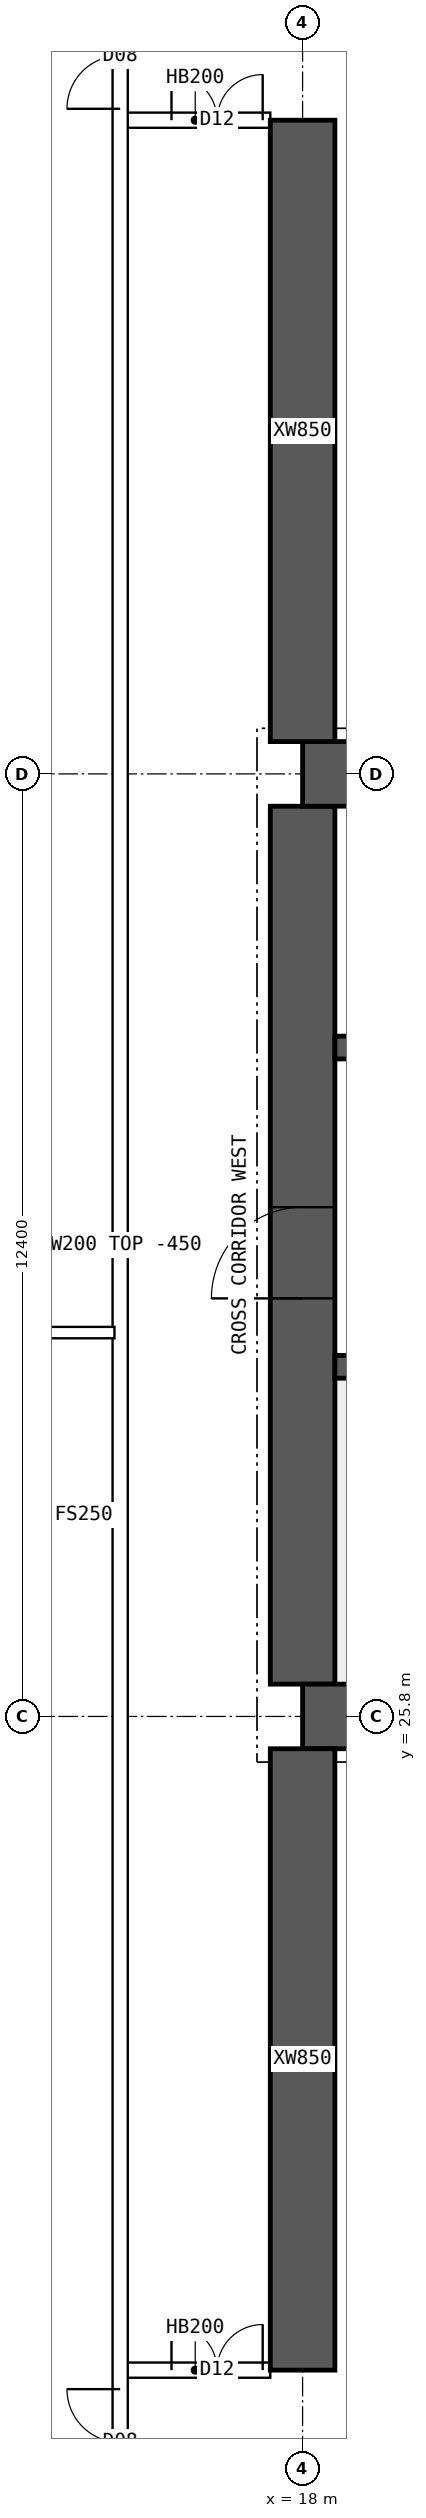
"""IFC4 building model, lengths in metres.
Left out: names, types, materials, properties, quantities, classifications, styles, units other than length and angle.
Written with IfcOpenShell. Run it as: python <this file> out.ifc"""

import sys

from ifc_helpers import new_model, si_unit, direction, frame, frame_2d, origin, place, context, subcontext, project, spatial, polyline, rectangle, outline, extrude, element, fill, save


model = new_model("IFC4")
c1 = context("Model", 3, precision=1e-05, world=origin(), true_north=direction((0.0, 1.0)))
c2 = subcontext(c1, "Body", "Model", "MODEL_VIEW")
j1 = project(units=[si_unit("LENGTHUNIT", "METRE"), si_unit("PLANEANGLEUNIT", "RADIAN")], contexts=[c1])
p1 = place(None, origin())
s1 = spatial("IfcSite", under=j1, at=p1, CompositionType="ELEMENT")
p2 = place(p1, origin())
s2 = spatial("IfcBuilding", under=s1, at=p2, CompositionType="ELEMENT")
p3 = place(p2, frame((0.0, 0.0, 144.85)))
s3 = spatial("IfcBuildingStorey", under=s2, at=p3, CompositionType="ELEMENT", Elevation=144.85)
for number, where, z_axis, x_axis in (
    (1, (18.0, 25.8, 0.0), (0.0, 0.0, 1.0), (1.0, 0.0, 0.0)),
    (2, (18.0, 38.2, 0.0), (0.0, 0.0, 1.0), (1.0, 0.0, 0.0)),
):
    element("IfcWall", number, at=place(p3, frame(where, z_axis=z_axis, x_axis=x_axis)), inside=s3, PredefinedType="SHEAR", context=c2, shape_type="SweptSolid", body=[
        extrude(rectangle(XDim=48.0, YDim=0.85, at=frame_2d((24.0, 0.0))), origin(), (0.0, 0.0, 1.0), 3.75),
    ])
p4 = place(p3, frame((18.0, 26.225, 0.0), z_axis=(0.0, 0.0, 1.0), x_axis=(0.0, 1.0, 0.0)))
e3 = element("IfcWall", 3, at=p4, inside=s3, PredefinedType="SHEAR", context=c2, shape_type="SweptSolid", body=[
    extrude(rectangle(XDim=11.55, YDim=0.85, at=frame_2d((5.775, 0.0))), origin(), (0.0, 0.0, 1.0), 3.75),
])
p5 = place(p4, frame((5.075, 0.0, 0.0)))
e4 = element("IfcOpeningElement", 4, at=p5, cuts=e3, PredefinedType="OPENING", context=c2, shape_type="SweptSolid", body=[
    extrude(rectangle(XDim=1.2, YDim=2.1, at=frame_2d((0.6, 1.05))), frame((0.0, 0.435, 0.0), z_axis=(0.0, -1.0, 0.0), x_axis=(1.0, 0.0, 0.0)), (0.0, 0.0, 1.0), 0.87),
])
p6 = place(p3, frame((18.425, 30.4, 0.0), z_axis=(0.0, 0.0, 1.0), x_axis=(1.0, 0.0, 0.0)))
e5 = element("IfcWall", 5, at=p6, inside=s3, PredefinedType="SHEAR", context=c2, shape_type="SweptSolid", body=[
    extrude(rectangle(XDim=47.15, YDim=0.3, at=frame_2d((23.575, 0.0))), origin(), (0.0, 0.0, 1.0), 3.75),
])
p7 = place(p6, frame((0.4, 0.0, 0.0)))
e6 = element("IfcOpeningElement", 6, at=p7, cuts=e5, PredefinedType="OPENING", context=c2, shape_type="SweptSolid", body=[
    extrude(rectangle(XDim=1.0, YDim=2.1, at=frame_2d((0.5, 1.05))), frame((0.0, 0.16, 0.0), z_axis=(0.0, -1.0, 0.0), x_axis=(1.0, 0.0, 0.0)), (0.0, 0.0, 1.0), 0.32),
])
p8 = place(p6, frame((45.75, 0.0, 0.0)))
e7 = element("IfcOpeningElement", 7, at=p8, cuts=e5, PredefinedType="OPENING", context=c2, shape_type="SweptSolid", body=[
    extrude(rectangle(XDim=1.0, YDim=2.1, at=frame_2d((0.5, 1.05))), frame((0.0, 0.16, 0.0), z_axis=(0.0, -1.0, 0.0), x_axis=(1.0, 0.0, 0.0)), (0.0, 0.0, 1.0), 0.32),
])
p9 = place(p6, frame((8.325, 0.0, 0.0)))
e8 = element("IfcOpeningElement", 8, at=p9, cuts=e5, PredefinedType="OPENING", context=c2, shape_type="SweptSolid", body=[
    extrude(rectangle(XDim=1.1, YDim=2.1, at=frame_2d((0.55, 1.05))), frame((0.0, 0.16, 0.0), z_axis=(0.0, -1.0, 0.0), x_axis=(1.0, 0.0, 0.0)), (0.0, 0.0, 1.0), 0.32),
])
p10 = place(p6, frame((10.925, 0.0, 0.0)))
e9 = element("IfcOpeningElement", 9, at=p10, cuts=e5, PredefinedType="OPENING", context=c2, shape_type="SweptSolid", body=[
    extrude(rectangle(XDim=1.1, YDim=2.1, at=frame_2d((0.55, 1.05))), frame((0.0, 0.16, 0.0), z_axis=(0.0, -1.0, 0.0), x_axis=(1.0, 0.0, 0.0)), (0.0, 0.0, 1.0), 0.32),
])
p11 = place(p6, frame((13.525, 0.0, 0.0)))
e10 = element("IfcOpeningElement", 10, at=p11, cuts=e5, PredefinedType="OPENING", context=c2, shape_type="SweptSolid", body=[
    extrude(rectangle(XDim=1.1, YDim=2.1, at=frame_2d((0.55, 1.05))), frame((0.0, 0.16, 0.0), z_axis=(0.0, -1.0, 0.0), x_axis=(1.0, 0.0, 0.0)), (0.0, 0.0, 1.0), 0.32),
])
p12 = place(p6, frame((16.125, 0.0, 0.0)))
e11 = element("IfcOpeningElement", 11, at=p12, cuts=e5, PredefinedType="OPENING", context=c2, shape_type="SweptSolid", body=[
    extrude(rectangle(XDim=1.1, YDim=2.1, at=frame_2d((0.55, 1.05))), frame((0.0, 0.16, 0.0), z_axis=(0.0, -1.0, 0.0), x_axis=(1.0, 0.0, 0.0)), (0.0, 0.0, 1.0), 0.32),
])
p13 = place(p6, frame((18.9, 0.0, 0.0)))
e12 = element("IfcOpeningElement", 12, at=p13, cuts=e5, PredefinedType="OPENING", context=c2, shape_type="SweptSolid", body=[
    extrude(rectangle(XDim=0.9, YDim=2.1, at=frame_2d((0.45, 1.05))), frame((0.0, 0.16, 0.0), z_axis=(0.0, -1.0, 0.0), x_axis=(1.0, 0.0, 0.0)), (0.0, 0.0, 1.0), 0.32),
])
p14 = place(p6, frame((30.192, 0.0, 0.0)))
e13 = element("IfcOpeningElement", 13, at=p14, cuts=e5, PredefinedType="OPENING", context=c2, shape_type="SweptSolid", body=[
    extrude(rectangle(XDim=1.1, YDim=2.1, at=frame_2d((0.55, 1.05))), frame((0.0, 0.16, 0.0), z_axis=(0.0, -1.0, 0.0), x_axis=(1.0, 0.0, 0.0)), (0.0, 0.0, 1.0), 0.32),
])
p15 = place(p6, frame((33.725, 0.0, 0.0)))
e14 = element("IfcOpeningElement", 14, at=p15, cuts=e5, PredefinedType="OPENING", context=c2, shape_type="SweptSolid", body=[
    extrude(rectangle(XDim=1.1, YDim=2.1, at=frame_2d((0.55, 1.05))), frame((0.0, 0.16, 0.0), z_axis=(0.0, -1.0, 0.0), x_axis=(1.0, 0.0, 0.0)), (0.0, 0.0, 1.0), 0.32),
])
p16 = place(p6, frame((37.258, 0.0, 0.0)))
e15 = element("IfcOpeningElement", 15, at=p16, cuts=e5, PredefinedType="OPENING", context=c2, shape_type="SweptSolid", body=[
    extrude(rectangle(XDim=1.1, YDim=2.1, at=frame_2d((0.55, 1.05))), frame((0.0, 0.16, 0.0), z_axis=(0.0, -1.0, 0.0), x_axis=(1.0, 0.0, 0.0)), (0.0, 0.0, 1.0), 0.32),
])
p17 = place(p3, frame((18.425, 34.6, 0.0), z_axis=(0.0, 0.0, 1.0), x_axis=(1.0, 0.0, 0.0)))
e16 = element("IfcWall", 16, at=p17, inside=s3, PredefinedType="SHEAR", context=c2, shape_type="SweptSolid", body=[
    extrude(rectangle(XDim=47.15, YDim=0.3, at=frame_2d((23.575, 0.0))), origin(), (0.0, 0.0, 1.0), 3.75),
])
p18 = place(p17, frame((0.9, 0.0, 0.0)))
e17 = element("IfcOpeningElement", 17, at=p18, cuts=e16, PredefinedType="OPENING", context=c2, shape_type="SweptSolid", body=[
    extrude(rectangle(XDim=1.1, YDim=2.1, at=frame_2d((0.55, 1.05))), frame((0.0, 0.16, 0.0), z_axis=(0.0, -1.0, 0.0), x_axis=(1.0, 0.0, 0.0)), (0.0, 0.0, 1.0), 0.32),
])
p19 = place(p17, frame((45.15, 0.0, 0.0)))
e18 = element("IfcOpeningElement", 18, at=p19, cuts=e16, PredefinedType="OPENING", context=c2, shape_type="SweptSolid", body=[
    extrude(rectangle(XDim=1.1, YDim=2.1, at=frame_2d((0.55, 1.05))), frame((0.0, 0.16, 0.0), z_axis=(0.0, -1.0, 0.0), x_axis=(1.0, 0.0, 0.0)), (0.0, 0.0, 1.0), 0.32),
])
p20 = place(p17, frame((4.175, 0.0, 0.0)))
e19 = element("IfcOpeningElement", 19, at=p20, cuts=e16, PredefinedType="OPENING", context=c2, shape_type="SweptSolid", body=[
    extrude(rectangle(XDim=0.9, YDim=2.1, at=frame_2d((0.45, 1.05))), frame((0.0, 0.16, 0.0), z_axis=(0.0, -1.0, 0.0), x_axis=(1.0, 0.0, 0.0)), (0.0, 0.0, 1.0), 0.32),
])
p21 = place(p17, frame((42.075, 0.0, 0.0)))
e20 = element("IfcOpeningElement", 20, at=p21, cuts=e16, PredefinedType="OPENING", context=c2, shape_type="SweptSolid", body=[
    extrude(rectangle(XDim=0.9, YDim=2.1, at=frame_2d((0.45, 1.05))), frame((0.0, 0.16, 0.0), z_axis=(0.0, -1.0, 0.0), x_axis=(1.0, 0.0, 0.0)), (0.0, 0.0, 1.0), 0.32),
])
p22 = place(p17, frame((8.95, 0.0, 0.0)))
e21 = element("IfcOpeningElement", 21, at=p22, cuts=e16, PredefinedType="OPENING", context=c2, shape_type="SweptSolid", body=[
    extrude(rectangle(XDim=0.9, YDim=2.1, at=frame_2d((0.45, 1.05))), frame((0.0, 0.16, 0.0), z_axis=(0.0, -1.0, 0.0), x_axis=(1.0, 0.0, 0.0)), (0.0, 0.0, 1.0), 0.32),
])
p23 = place(p17, frame((12.924, 0.0, 0.0)))
e22 = element("IfcOpeningElement", 22, at=p23, cuts=e16, PredefinedType="OPENING", context=c2, shape_type="SweptSolid", body=[
    extrude(rectangle(XDim=0.9, YDim=2.1, at=frame_2d((0.45, 1.05))), frame((0.0, 0.16, 0.0), z_axis=(0.0, -1.0, 0.0), x_axis=(1.0, 0.0, 0.0)), (0.0, 0.0, 1.0), 0.32),
])
p24 = place(p17, frame((16.571, 0.0, 0.0)))
e23 = element("IfcOpeningElement", 23, at=p24, cuts=e16, PredefinedType="OPENING", context=c2, shape_type="SweptSolid", body=[
    extrude(rectangle(XDim=0.9, YDim=2.1, at=frame_2d((0.45, 1.05))), frame((0.0, 0.16, 0.0), z_axis=(0.0, -1.0, 0.0), x_axis=(1.0, 0.0, 0.0)), (0.0, 0.0, 1.0), 0.32),
])
p25 = place(p17, frame((20.33, 0.0, 0.0)))
e24 = element("IfcOpeningElement", 24, at=p25, cuts=e16, PredefinedType="OPENING", context=c2, shape_type="SweptSolid", body=[
    extrude(rectangle(XDim=0.9, YDim=2.1, at=frame_2d((0.45, 1.05))), frame((0.0, 0.16, 0.0), z_axis=(0.0, -1.0, 0.0), x_axis=(1.0, 0.0, 0.0)), (0.0, 0.0, 1.0), 0.32),
])
p26 = place(p17, frame((24.736, 0.0, 0.0)))
e25 = element("IfcOpeningElement", 25, at=p26, cuts=e16, PredefinedType="OPENING", context=c2, shape_type="SweptSolid", body=[
    extrude(rectangle(XDim=0.9, YDim=2.1, at=frame_2d((0.45, 1.05))), frame((0.0, 0.16, 0.0), z_axis=(0.0, -1.0, 0.0), x_axis=(1.0, 0.0, 0.0)), (0.0, 0.0, 1.0), 0.32),
])
p27 = place(p17, frame((27.533, 0.0, 0.0)))
e26 = element("IfcOpeningElement", 26, at=p27, cuts=e16, PredefinedType="OPENING", context=c2, shape_type="SweptSolid", body=[
    extrude(rectangle(XDim=0.9, YDim=2.1, at=frame_2d((0.45, 1.05))), frame((0.0, 0.16, 0.0), z_axis=(0.0, -1.0, 0.0), x_axis=(1.0, 0.0, 0.0)), (0.0, 0.0, 1.0), 0.32),
])
p28 = place(p17, frame((30.716, 0.0, 0.0)))
e27 = element("IfcOpeningElement", 27, at=p28, cuts=e16, PredefinedType="OPENING", context=c2, shape_type="SweptSolid", body=[
    extrude(rectangle(XDim=0.9, YDim=2.1, at=frame_2d((0.45, 1.05))), frame((0.0, 0.16, 0.0), z_axis=(0.0, -1.0, 0.0), x_axis=(1.0, 0.0, 0.0)), (0.0, 0.0, 1.0), 0.32),
])
p29 = place(p17, frame((34.667, 0.0, 0.0)))
e28 = element("IfcOpeningElement", 28, at=p29, cuts=e16, PredefinedType="OPENING", context=c2, shape_type="SweptSolid", body=[
    extrude(rectangle(XDim=0.9, YDim=2.1, at=frame_2d((0.45, 1.05))), frame((0.0, 0.16, 0.0), z_axis=(0.0, -1.0, 0.0), x_axis=(1.0, 0.0, 0.0)), (0.0, 0.0, 1.0), 0.32),
])
p30 = place(p17, frame((37.605, 0.0, 0.0)))
e29 = element("IfcOpeningElement", 29, at=p30, cuts=e16, PredefinedType="OPENING", context=c2, shape_type="SweptSolid", body=[
    extrude(rectangle(XDim=0.9, YDim=2.1, at=frame_2d((0.45, 1.05))), frame((0.0, 0.16, 0.0), z_axis=(0.0, -1.0, 0.0), x_axis=(1.0, 0.0, 0.0)), (0.0, 0.0, 1.0), 0.32),
])
for number, where, z_axis, x_axis in (
    (30, (18.0, 17.2, 0.0), (0.0, 0.0, 1.0), (0.0, 1.0, 0.0)),
    (31, (18.0, 38.625, 0.0), (0.0, 0.0, 1.0), (0.0, 1.0, 0.0)),
):
    element("IfcWall", number, at=place(p3, frame(where, z_axis=z_axis, x_axis=x_axis)), inside=s3, PredefinedType="SHEAR", context=c2, shape_type="SweptSolid", body=[
        extrude(rectangle(XDim=8.175, YDim=0.85, at=frame_2d((4.087, 0.0))), origin(), (0.0, 0.0, 1.0), 3.75),
    ])
p31 = place(p3, frame((15.6, 17.2, 0.0), z_axis=(0.0, 0.0, 1.0), x_axis=(1.0, 0.0, 0.0)))
e32 = element("IfcWall", 32, at=p31, inside=s3, PredefinedType="SOLIDWALL", context=c2, shape_type="SweptSolid", body=[
    extrude(rectangle(XDim=1.975, YDim=0.2, at=frame_2d((0.987, 0.0))), origin(), (0.0, 0.0, 1.0), 3.3),
])
p32 = place(p31, frame((0.675, 0.0, 0.0)))
e33 = element("IfcOpeningElement", 33, at=p32, cuts=e32, PredefinedType="OPENING", context=c2, shape_type="SweptSolid", body=[
    extrude(rectangle(XDim=1.2, YDim=2.1, at=frame_2d((0.6, 1.05))), frame((0.0, 0.11, 0.0), z_axis=(0.0, -1.0, 0.0), x_axis=(1.0, 0.0, 0.0)), (0.0, 0.0, 1.0), 0.22),
])
p33 = place(p3, frame((15.6, 46.8, 0.0), z_axis=(0.0, 0.0, 1.0), x_axis=(1.0, 0.0, 0.0)))
e34 = element("IfcWall", 34, at=p33, inside=s3, PredefinedType="SOLIDWALL", context=c2, shape_type="SweptSolid", body=[
    extrude(rectangle(XDim=1.975, YDim=0.2, at=frame_2d((0.987, 0.0))), origin(), (0.0, 0.0, 1.0), 3.3),
])
p34 = place(p33, frame((0.675, 0.0, 0.0)))
e35 = element("IfcOpeningElement", 35, at=p34, cuts=e34, PredefinedType="OPENING", context=c2, shape_type="SweptSolid", body=[
    extrude(rectangle(XDim=1.2, YDim=2.1, at=frame_2d((0.6, 1.05))), frame((0.0, 0.11, 0.0), z_axis=(0.0, -1.0, 0.0), x_axis=(1.0, 0.0, 0.0)), (0.0, 0.0, 1.0), 0.22),
])
p35 = place(p3, frame((8.705, 30.85, 0.0), z_axis=(0.0, 0.0, 1.0), x_axis=(1.0, 0.0, 0.0)))
e36 = element("IfcWall", 36, at=p35, inside=s3, PredefinedType="PARTITIONING", context=c2, shape_type="SweptSolid", body=[
    extrude(outline(polyline([(0.0, 0.0), (6.82, 0.0), (6.82, 3.3), (3.597, 3.3), (3.595, 2.85), (2.997, 2.85), (2.995, 3.3), (0.0, 3.3), (0.0, 0.0)])), frame((0.0, 0.075, 0.0), z_axis=(0.0, -1.0, 0.0), x_axis=(1.0, 0.0, 0.0)), (0.0, 0.0, 1.0), 0.15),
])
p36 = place(p3, frame((15.6, 10.446, 0.0), z_axis=(0.0, 0.0, 1.0), x_axis=(0.0, 1.0, 0.0)))
e37 = element("IfcWall", 37, at=p36, inside=s3, PredefinedType="SOLIDWALL", context=c2, shape_type="SweptSolid", body=[
    extrude(rectangle(XDim=43.107, YDim=0.2, at=frame_2d((21.554, 0.0))), origin(), (0.0, 0.0, 1.0), 3.3),
])
p37 = place(p36, frame((5.104, 0.0, 0.0)))
e38 = element("IfcOpeningElement", 38, at=p37, cuts=e37, PredefinedType="OPENING", context=c2, shape_type="SweptSolid", body=[
    extrude(rectangle(XDim=1.4, YDim=2.1, at=frame_2d((0.7, 1.05))), frame((0.0, 0.11, 0.0), z_axis=(0.0, -1.0, 0.0), x_axis=(1.0, 0.0, 0.0)), (0.0, 0.0, 1.0), 0.22),
])
p38 = place(p36, frame((36.504, 0.0, 0.0)))
e39 = element("IfcOpeningElement", 39, at=p38, cuts=e37, PredefinedType="OPENING", context=c2, shape_type="SweptSolid", body=[
    extrude(rectangle(XDim=1.4, YDim=2.1, at=frame_2d((0.7, 1.05))), frame((0.0, 0.11, 0.0), z_axis=(0.0, -1.0, 0.0), x_axis=(1.0, 0.0, 0.0)), (0.0, 0.0, 1.0), 0.22),
])
p39 = place(p5, origin())
e40 = element("IfcDoor", 40, at=p39, inside=s3, OperationType="SINGLE_SWING_LEFT", PredefinedType="DOOR", context=c2, shape_type="SweptSolid", body=[
    extrude(rectangle(XDim=1.2, YDim=2.1, at=frame_2d((0.6, 1.05))), frame((0.0, 0.025, 0.0), z_axis=(0.0, -1.0, 0.0), x_axis=(1.0, 0.0, 0.0)), (0.0, 0.0, 1.0), 0.05),
])
fill(e4, e40)
p40 = place(p32, origin())
e41 = element("IfcDoor", 41, at=p40, inside=s3, OperationType="DOUBLE_DOOR_SINGLE_SWING", PredefinedType="DOOR", context=c2, shape_type="SweptSolid", body=[
    extrude(rectangle(XDim=1.2, YDim=2.1, at=frame_2d((0.6, 1.05))), frame((0.0, 0.025, 0.0), z_axis=(0.0, -1.0, 0.0), x_axis=(1.0, 0.0, 0.0)), (0.0, 0.0, 1.0), 0.05),
])
fill(e33, e41)
p41 = place(p34, origin())
e42 = element("IfcDoor", 42, at=p41, inside=s3, OperationType="DOUBLE_DOOR_SINGLE_SWING", PredefinedType="DOOR", context=c2, shape_type="SweptSolid", body=[
    extrude(rectangle(XDim=1.2, YDim=2.1, at=frame_2d((0.6, 1.05))), frame((0.0, 0.025, 0.0), z_axis=(0.0, -1.0, 0.0), x_axis=(1.0, 0.0, 0.0)), (0.0, 0.0, 1.0), 0.05),
])
fill(e35, e42)
p42 = place(p37, origin())
e43 = element("IfcDoor", 43, at=p42, inside=s3, OperationType="DOUBLE_DOOR_SINGLE_SWING", PredefinedType="DOOR", context=c2, shape_type="SweptSolid", body=[
    extrude(rectangle(XDim=1.4, YDim=2.1, at=frame_2d((0.7, 1.05))), frame((0.0, 0.025, 0.0), z_axis=(0.0, -1.0, 0.0), x_axis=(1.0, 0.0, 0.0)), (0.0, 0.0, 1.0), 0.05),
])
fill(e38, e43)
p43 = place(p38, origin())
e44 = element("IfcDoor", 44, at=p43, inside=s3, OperationType="DOUBLE_DOOR_SINGLE_SWING", PredefinedType="DOOR", context=c2, shape_type="SweptSolid", body=[
    extrude(rectangle(XDim=1.4, YDim=2.1, at=frame_2d((0.7, 1.05))), frame((0.0, 0.025, 0.0), z_axis=(0.0, -1.0, 0.0), x_axis=(1.0, 0.0, 0.0)), (0.0, 0.0, 1.0), 0.05),
])
fill(e39, e44)
save(model, sys.argv[1])
